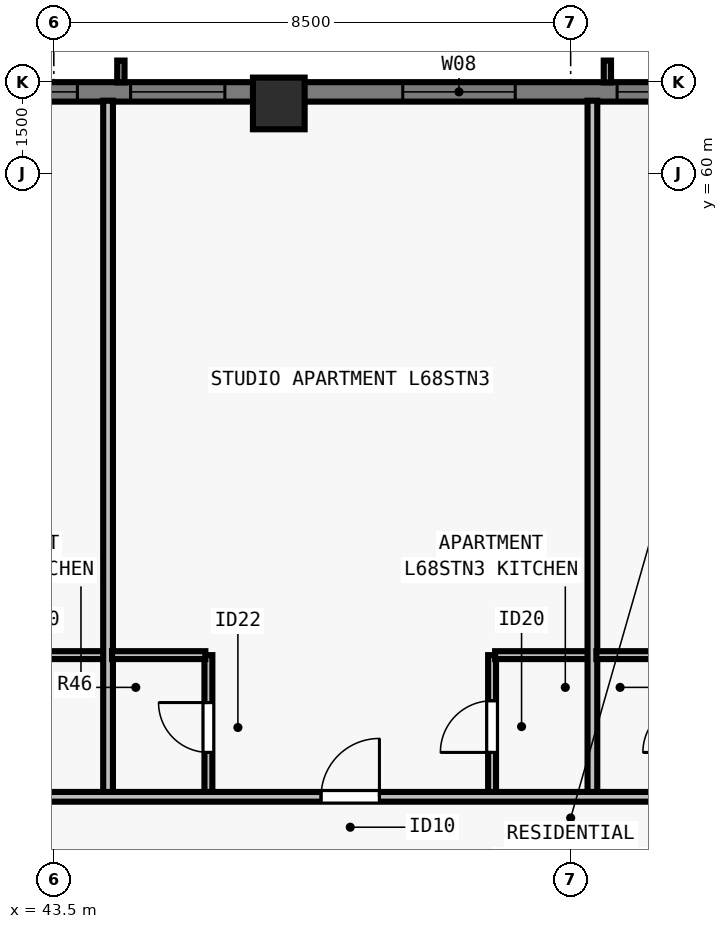
"""IFC4 building model, lengths in metres.
Left out: names, types, materials, properties, quantities, classifications, styles, units other than length and angle.
Written with IfcOpenShell. Run it as: python <this file> out.ifc"""

import sys

from ifc_helpers import new_model, si_unit, direction, frame, frame_2d, origin, origin_2d, place, context, subcontext, project, spatial, rectangle, extrude, element, fill, save


model = new_model("IFC4")
c1 = context("Model", 3, precision=1e-05, world=origin(), true_north=direction((0.0, 1.0)))
c2 = subcontext(c1, "Body", "Model", "MODEL_VIEW")
j1 = project(units=[si_unit("LENGTHUNIT", "METRE"), si_unit("PLANEANGLEUNIT", "RADIAN")], contexts=[c1])
p1 = place(None, origin())
s1 = spatial("IfcSite", under=j1, at=p1, CompositionType="ELEMENT")
p2 = place(p1, origin())
s2 = spatial("IfcBuilding", under=s1, at=p2, CompositionType="ELEMENT")
p3 = place(p2, frame((0.0, 0.0, 248.0)))
s3 = spatial("IfcBuildingStorey", under=s2, at=p3, CompositionType="ELEMENT", Elevation=248.0)
p4 = place(p3, frame((47.2, 61.15, 0.0), z_axis=(0.0, 0.0, 1.0), x_axis=(1.0, 0.0, 0.0)))
e1 = element("IfcColumn", 1, at=p4, inside=s3, PredefinedType="COLUMN", context=c2, shape_type="SweptSolid", body=[
    extrude(rectangle(XDim=0.85, YDim=0.85, at=origin_2d()), origin(), (0.0, 0.0, 1.0), 3.5),
])
p5 = place(p3, frame((34.5, 61.34, 0.0), z_axis=(0.0, 0.0, 1.0), x_axis=(1.0, 0.0, 0.0)))
e2 = element("IfcWall", 2, at=p5, inside=s3, PredefinedType="SOLIDWALL", context=c2, shape_type="SweptSolid", body=[
    extrude(rectangle(XDim=34.702, YDim=0.32, at=frame_2d((17.351, 0.0))), origin(), (0.0, 0.0, 1.0), 3.29),
])
p6 = place(p5, frame((4.763, 0.0, 0.8)))
e3 = element("IfcOpeningElement", 3, at=p6, cuts=e2, PredefinedType="OPENING", context=c2, shape_type="SweptSolid", body=[
    extrude(rectangle(XDim=1.55, YDim=1.678, at=frame_2d((0.775, 0.839))), frame((0.0, 0.17, 0.0), z_axis=(0.0, -1.0, 0.0), x_axis=(1.0, 0.0, 0.0)), (0.0, 0.0, 1.0), 0.34),
])
p7 = place(p5, frame((7.538, 0.0, 0.8)))
e4 = element("IfcOpeningElement", 4, at=p7, cuts=e2, PredefinedType="OPENING", context=c2, shape_type="SweptSolid", body=[
    extrude(rectangle(XDim=1.85, YDim=1.678, at=frame_2d((0.925, 0.839))), frame((0.0, 0.17, 0.0), z_axis=(0.0, -1.0, 0.0), x_axis=(1.0, 0.0, 0.0)), (0.0, 0.0, 1.0), 0.34),
])
p8 = place(p5, frame((10.263, 0.0, 0.8)))
e5 = element("IfcOpeningElement", 5, at=p8, cuts=e2, PredefinedType="OPENING", context=c2, shape_type="SweptSolid", body=[
    extrude(rectangle(XDim=1.55, YDim=1.678, at=frame_2d((0.775, 0.839))), frame((0.0, 0.17, 0.0), z_axis=(0.0, -1.0, 0.0), x_axis=(1.0, 0.0, 0.0)), (0.0, 0.0, 1.0), 0.34),
])
p9 = place(p5, frame((14.738, 0.0, 0.8)))
e6 = element("IfcOpeningElement", 6, at=p9, cuts=e2, PredefinedType="OPENING", context=c2, shape_type="SweptSolid", body=[
    extrude(rectangle(XDim=1.85, YDim=1.678, at=frame_2d((0.925, 0.839))), frame((0.0, 0.17, 0.0), z_axis=(0.0, -1.0, 0.0), x_axis=(1.0, 0.0, 0.0)), (0.0, 0.0, 1.0), 0.34),
])
p10 = place(p5, frame((18.264, 0.0, 0.8)))
e7 = element("IfcOpeningElement", 7, at=p10, cuts=e2, PredefinedType="OPENING", context=c2, shape_type="SweptSolid", body=[
    extrude(rectangle(XDim=1.55, YDim=1.678, at=frame_2d((0.775, 0.839))), frame((0.0, 0.17, 0.0), z_axis=(0.0, -1.0, 0.0), x_axis=(1.0, 0.0, 0.0)), (0.0, 0.0, 1.0), 0.34),
])
p11 = place(p5, frame((25.014, 0.0, 0.8)))
e8 = element("IfcOpeningElement", 8, at=p11, cuts=e2, PredefinedType="OPENING", context=c2, shape_type="SweptSolid", body=[
    extrude(rectangle(XDim=1.55, YDim=1.678, at=frame_2d((0.775, 0.839))), frame((0.0, 0.17, 0.0), z_axis=(0.0, -1.0, 0.0), x_axis=(1.0, 0.0, 0.0)), (0.0, 0.0, 1.0), 0.34),
])
p12 = place(p5, frame((28.24, 0.0, 0.8)))
e9 = element("IfcOpeningElement", 9, at=p12, cuts=e2, PredefinedType="OPENING", context=c2, shape_type="SweptSolid", body=[
    extrude(rectangle(XDim=1.85, YDim=1.678, at=frame_2d((0.925, 0.839))), frame((0.0, 0.17, 0.0), z_axis=(0.0, -1.0, 0.0), x_axis=(1.0, 0.0, 0.0)), (0.0, 0.0, 1.0), 0.34),
])
p13 = place(p3, frame((29.805, 49.748, 0.0), z_axis=(0.0, 0.0, 1.0), x_axis=(1.0, 0.0, 0.0)))
e10 = element("IfcWall", 10, at=p13, inside=s3, PredefinedType="PARTITIONING", context=c2, shape_type="SweptSolid", body=[
    extrude(rectangle(XDim=44.39, YDim=0.16, at=frame_2d((22.195, 0.0))), origin(), (0.0, 0.0, 1.0), 2.958),
])
p14 = place(p13, frame((3.494, 0.0, 0.0)))
e11 = element("IfcOpeningElement", 11, at=p14, cuts=e10, PredefinedType="OPENING", context=c2, shape_type="SweptSolid", body=[
    extrude(rectangle(XDim=0.96, YDim=2.18, at=frame_2d((0.48, 1.09))), frame((0.0, 0.09, 0.0), z_axis=(0.0, -1.0, 0.0), x_axis=(1.0, 0.0, 0.0)), (0.0, 0.0, 1.0), 0.18),
])
p15 = place(p13, frame((10.73, 0.0, 0.0)))
e12 = element("IfcOpeningElement", 12, at=p15, cuts=e10, PredefinedType="OPENING", context=c2, shape_type="SweptSolid", body=[
    extrude(rectangle(XDim=0.96, YDim=2.18, at=frame_2d((0.48, 1.09))), frame((0.0, 0.09, 0.0), z_axis=(0.0, -1.0, 0.0), x_axis=(1.0, 0.0, 0.0)), (0.0, 0.0, 1.0), 0.18),
])
p16 = place(p13, frame((18.09, 0.0, 0.0)))
e13 = element("IfcOpeningElement", 13, at=p16, cuts=e10, PredefinedType="OPENING", context=c2, shape_type="SweptSolid", body=[
    extrude(rectangle(XDim=0.96, YDim=2.18, at=frame_2d((0.48, 1.09))), frame((0.0, 0.09, 0.0), z_axis=(0.0, -1.0, 0.0), x_axis=(1.0, 0.0, 0.0)), (0.0, 0.0, 1.0), 0.18),
])
p17 = place(p13, frame((25.45, 0.0, 0.0)))
e14 = element("IfcOpeningElement", 14, at=p17, cuts=e10, PredefinedType="OPENING", context=c2, shape_type="SweptSolid", body=[
    extrude(rectangle(XDim=0.96, YDim=2.18, at=frame_2d((0.48, 1.09))), frame((0.0, 0.09, 0.0), z_axis=(0.0, -1.0, 0.0), x_axis=(1.0, 0.0, 0.0)), (0.0, 0.0, 1.0), 0.18),
])
p18 = place(p13, frame((32.81, 0.0, 0.0)))
e15 = element("IfcOpeningElement", 15, at=p18, cuts=e10, PredefinedType="OPENING", context=c2, shape_type="SweptSolid", body=[
    extrude(rectangle(XDim=0.96, YDim=2.18, at=frame_2d((0.48, 1.09))), frame((0.0, 0.09, 0.0), z_axis=(0.0, -1.0, 0.0), x_axis=(1.0, 0.0, 0.0)), (0.0, 0.0, 1.0), 0.18),
])
p19 = place(p13, frame((40.294, 0.0, 0.0)))
e16 = element("IfcOpeningElement", 16, at=p19, cuts=e10, PredefinedType="OPENING", context=c2, shape_type="SweptSolid", body=[
    extrude(rectangle(XDim=0.96, YDim=2.18, at=frame_2d((0.48, 1.09))), frame((0.0, 0.09, 0.0), z_axis=(0.0, -1.0, 0.0), x_axis=(1.0, 0.0, 0.0)), (0.0, 0.0, 1.0), 0.18),
])
p20 = place(p3, frame((42.792, 52.077, 0.0), z_axis=(0.0, 0.0, 1.0), x_axis=(1.0, 0.0, 0.0)))
e17 = element("IfcWall", 17, at=p20, inside=s3, PredefinedType="PLUMBINGWALL", context=c2, shape_type="SweptSolid", body=[
    extrude(rectangle(XDim=1.6, YDim=0.13, at=frame_2d((0.8, 0.0))), origin(), (0.0, 0.0, 1.0), 3.29),
])
p21 = place(p3, frame((44.393, 49.827, 0.0), z_axis=(0.0, 0.0, 1.0), x_axis=(0.0, 1.0, 0.0)))
e18 = element("IfcWall", 18, at=p21, inside=s3, PredefinedType="PARTITIONING", context=c2, shape_type="SweptSolid", body=[
    extrude(rectangle(XDim=11.368, YDim=0.16, at=frame_2d((5.684, 0.0))), origin(), (0.0, 0.0, 1.0), 3.29),
])
p22 = place(p3, frame((46.042, 49.827, 0.0), z_axis=(0.0, 0.0, 1.0), x_axis=(0.0, 1.0, 0.0)))
e19 = element("IfcWall", 19, at=p22, inside=s3, PredefinedType="PLUMBINGWALL", context=c2, shape_type="SweptSolid", body=[
    extrude(rectangle(XDim=2.25, YDim=0.13, at=frame_2d((1.125, 0.0))), origin(), (0.0, 0.0, 1.0), 3.29),
])
p23 = place(p22, frame((0.65, 0.0, 0.0)))
e20 = element("IfcOpeningElement", 20, at=p23, cuts=e19, PredefinedType="OPENING", context=c2, shape_type="SweptSolid", body=[
    extrude(rectangle(XDim=0.82, YDim=2.1, at=frame_2d((0.41, 1.05))), frame((0.0, 0.075, 0.0), z_axis=(0.0, -1.0, 0.0), x_axis=(1.0, 0.0, 0.0)), (0.0, 0.0, 1.0), 0.15),
])
p24 = place(p3, frame((44.458, 52.077, 0.0), z_axis=(0.0, 0.0, 1.0), x_axis=(1.0, 0.0, 0.0)))
e21 = element("IfcWall", 21, at=p24, inside=s3, PredefinedType="PLUMBINGWALL", context=c2, shape_type="SweptSolid", body=[
    extrude(rectangle(XDim=1.535, YDim=0.13, at=frame_2d((0.768, 0.0))), origin(), (0.0, 0.0, 1.0), 3.29),
])
p25 = place(p3, frame((50.708, 49.827, 0.0), z_axis=(0.0, 0.0, 1.0), x_axis=(0.0, 1.0, 0.0)))
e22 = element("IfcWall", 22, at=p25, inside=s3, PredefinedType="PLUMBINGWALL", context=c2, shape_type="SweptSolid", body=[
    extrude(rectangle(XDim=2.25, YDim=0.13, at=frame_2d((1.125, 0.0))), origin(), (0.0, 0.0, 1.0), 3.29),
])
p26 = place(p25, frame((0.65, 0.0, 0.0)))
e23 = element("IfcOpeningElement", 23, at=p26, cuts=e22, PredefinedType="OPENING", context=c2, shape_type="SweptSolid", body=[
    extrude(rectangle(XDim=0.85, YDim=2.1, at=frame_2d((0.425, 1.05))), frame((0.0, 0.075, 0.0), z_axis=(0.0, -1.0, 0.0), x_axis=(1.0, 0.0, 0.0)), (0.0, 0.0, 1.0), 0.15),
])
p27 = place(p3, frame((50.758, 52.077, 0.0), z_axis=(0.0, 0.0, 1.0), x_axis=(1.0, 0.0, 0.0)))
e24 = element("IfcWall", 24, at=p27, inside=s3, PredefinedType="PLUMBINGWALL", context=c2, shape_type="SweptSolid", body=[
    extrude(rectangle(XDim=1.6, YDim=0.13, at=frame_2d((0.8, 0.0))), origin(), (0.0, 0.0, 1.0), 3.29),
])
p28 = place(p3, frame((52.357, 49.827, 0.0), z_axis=(0.0, 0.0, 1.0), x_axis=(0.0, 1.0, 0.0)))
e25 = element("IfcWall", 25, at=p28, inside=s3, PredefinedType="PARTITIONING", context=c2, shape_type="SweptSolid", body=[
    extrude(rectangle(XDim=11.368, YDim=0.16, at=frame_2d((5.684, 0.0))), origin(), (0.0, 0.0, 1.0), 2.958),
])
p29 = place(p3, frame((52.423, 52.077, 0.0), z_axis=(0.0, 0.0, 1.0), x_axis=(1.0, 0.0, 0.0)))
e26 = element("IfcWall", 26, at=p29, inside=s3, PredefinedType="PLUMBINGWALL", context=c2, shape_type="SweptSolid", body=[
    extrude(rectangle(XDim=1.535, YDim=0.13, at=frame_2d((0.768, 0.0))), origin(), (0.0, 0.0, 1.0), 3.29),
])
p30 = place(p7, origin())
e27 = element("IfcWindow", 27, at=p30, inside=s3, PartitioningType="SINGLE_PANEL", PredefinedType="WINDOW", context=c2, shape_type="SweptSolid", body=[
    extrude(rectangle(XDim=1.85, YDim=1.678, at=frame_2d((0.925, 0.839))), frame((0.0, -0.05, 0.0), z_axis=(0.0, -1.0, 0.0), x_axis=(1.0, 0.0, 0.0)), (0.0, 0.0, 1.0), 0.06),
])
fill(e4, e27)
p31 = place(p8, origin())
e28 = element("IfcWindow", 28, at=p31, inside=s3, PartitioningType="SINGLE_PANEL", PredefinedType="WINDOW", context=c2, shape_type="SweptSolid", body=[
    extrude(rectangle(XDim=1.55, YDim=1.678, at=frame_2d((0.775, 0.839))), frame((0.0, -0.05, 0.0), z_axis=(0.0, -1.0, 0.0), x_axis=(1.0, 0.0, 0.0)), (0.0, 0.0, 1.0), 0.06),
])
fill(e5, e28)
p32 = place(p9, origin())
e29 = element("IfcWindow", 29, at=p32, inside=s3, PartitioningType="SINGLE_PANEL", PredefinedType="WINDOW", context=c2, shape_type="SweptSolid", body=[
    extrude(rectangle(XDim=1.85, YDim=1.678, at=frame_2d((0.925, 0.839))), frame((0.0, -0.05, 0.0), z_axis=(0.0, -1.0, 0.0), x_axis=(1.0, 0.0, 0.0)), (0.0, 0.0, 1.0), 0.06),
])
fill(e6, e29)
p33 = place(p10, origin())
e30 = element("IfcWindow", 30, at=p33, inside=s3, PartitioningType="SINGLE_PANEL", PredefinedType="WINDOW", context=c2, shape_type="SweptSolid", body=[
    extrude(rectangle(XDim=1.55, YDim=1.678, at=frame_2d((0.775, 0.839))), frame((0.0, -0.05, 0.0), z_axis=(0.0, -1.0, 0.0), x_axis=(1.0, 0.0, 0.0)), (0.0, 0.0, 1.0), 0.06),
])
fill(e7, e30)
p34 = place(p23, origin())
e31 = element("IfcDoor", 31, at=p34, inside=s3, OperationType="SINGLE_SWING_RIGHT", PredefinedType="DOOR", context=c2, shape_type="SweptSolid", body=[
    extrude(rectangle(XDim=0.82, YDim=2.1, at=frame_2d((0.41, 1.05))), frame((0.0, 0.025, 0.0), z_axis=(0.0, -1.0, 0.0), x_axis=(1.0, 0.0, 0.0)), (0.0, 0.0, 1.0), 0.05),
])
fill(e20, e31)
p35 = place(p26, origin())
e32 = element("IfcDoor", 32, at=p35, inside=s3, OperationType="SINGLE_SWING_LEFT", PredefinedType="DOOR", context=c2, shape_type="SweptSolid", body=[
    extrude(rectangle(XDim=0.85, YDim=2.1, at=frame_2d((0.425, 1.05))), frame((0.0, 0.025, 0.0), z_axis=(0.0, -1.0, 0.0), x_axis=(1.0, 0.0, 0.0)), (0.0, 0.0, 1.0), 0.05),
])
fill(e23, e32)
p36 = place(p16, origin())
e33 = element("IfcDoor", 33, at=p36, inside=s3, OperationType="SINGLE_SWING_RIGHT", PredefinedType="DOOR", context=c2, shape_type="SweptSolid", body=[
    extrude(rectangle(XDim=0.96, YDim=2.18, at=frame_2d((0.48, 1.09))), frame((0.0, 0.025, 0.0), z_axis=(0.0, -1.0, 0.0), x_axis=(1.0, 0.0, 0.0)), (0.0, 0.0, 1.0), 0.05),
])
fill(e13, e33)
save(model, sys.argv[1])
